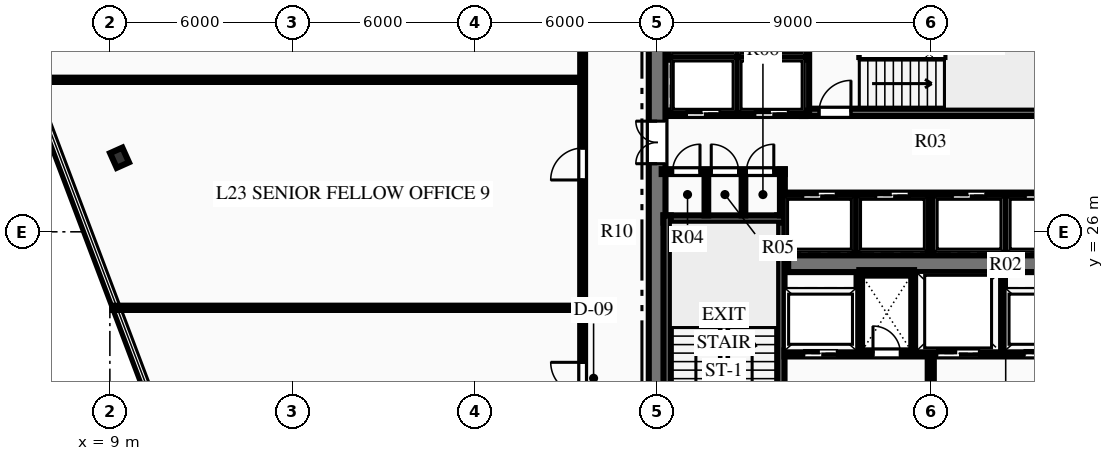
"""IFC4 building model, lengths in metres.
Left out: names, types, materials, properties, quantities, classifications, styles, units other than length and angle.
Written with IfcOpenShell. Run it as: python <this file> out.ifc"""

import sys

from ifc_helpers import new_model, si_unit, direction, frame, frame_2d, origin, origin_2d, place, context, subcontext, project, spatial, rectangle, i_section, extrude, element, fill, save


model = new_model("IFC4")
c1 = context("Model", 3, precision=1e-05, world=origin(), true_north=direction((0.0, 1.0)))
c2 = subcontext(c1, "Body", "Model", "MODEL_VIEW")
j1 = project(units=[si_unit("LENGTHUNIT", "METRE"), si_unit("PLANEANGLEUNIT", "RADIAN")], contexts=[c1])
p1 = place(None, origin())
s1 = spatial("IfcSite", under=j1, at=p1, CompositionType="ELEMENT")
p2 = place(p1, origin())
s2 = spatial("IfcBuilding", under=s1, at=p2, CompositionType="ELEMENT")
p3 = place(p2, frame((0.0, 0.0, 97.95)))
s3 = spatial("IfcBuildingStorey", under=s2, at=p3, CompositionType="ELEMENT", Elevation=97.95)
p4 = place(p3, frame((27.0, 18.275, 0.0), z_axis=(0.0, 0.0, 1.0), x_axis=(0.0, 1.0, 0.0)))
e1 = element("IfcWall", 1, at=p4, inside=s3, PredefinedType="SHEAR", context=c2, shape_type="SweptSolid", body=[
    extrude(rectangle(XDim=15.45, YDim=0.55, at=frame_2d((7.725, 0.0))), origin(), (0.0, 0.0, 1.0), 3.75),
])
p5 = place(p4, frame((9.965, 0.0, 0.0)))
e2 = element("IfcOpeningElement", 2, at=p5, cuts=e1, PredefinedType="OPENING", context=c2, shape_type="SweptSolid", body=[
    extrude(rectangle(XDim=1.4, YDim=2.2, at=frame_2d((0.7, 1.1))), frame((0.0, 0.285, 0.0), z_axis=(0.0, -1.0, 0.0), x_axis=(1.0, 0.0, 0.0)), (0.0, 0.0, 1.0), 0.57),
])
p6 = place(p3, frame((31.31, 24.95, 0.0), z_axis=(0.0, 0.0, 1.0), x_axis=(1.0, 0.0, 0.0)))
e3 = element("IfcWall", 3, at=p6, inside=s3, PredefinedType="SHEAR", context=c2, shape_type="SweptSolid", body=[
    extrude(rectangle(XDim=9.38, YDim=0.55, at=frame_2d((4.69, 0.0))), origin(), (0.0, 0.0, 1.0), 3.75),
])
p7 = place(p3, frame((31.07, 18.28, 0.0), z_axis=(0.0, 0.0, 1.0), x_axis=(0.0, 1.0, 0.0)))
e4 = element("IfcWall", 4, at=p7, inside=s3, PredefinedType="SHEAR", context=c2, shape_type="SweptSolid", body=[
    extrude(rectangle(XDim=8.26, YDim=0.24, at=frame_2d((4.13, 0.0))), origin(), (0.0, 0.0, 1.0), 3.75),
])
p8 = place(p7, frame((0.365, 0.0, 0.0)))
e5 = element("IfcOpeningElement", 5, at=p8, cuts=e4, PredefinedType="OPENING", context=c2, shape_type="SweptSolid", body=[
    extrude(rectangle(XDim=1.05, YDim=2.15, at=frame_2d((0.525, 1.075))), frame((0.0, 0.13, 0.0), z_axis=(0.0, -1.0, 0.0), x_axis=(1.0, 0.0, 0.0)), (0.0, 0.0, 1.0), 0.26),
])
p9 = place(p3, frame((27.21, 26.42, 0.0), z_axis=(0.0, 0.0, 1.0), x_axis=(1.0, 0.0, 0.0)))
e6 = element("IfcWall", 6, at=p9, inside=s3, PredefinedType="SHEAR", context=c2, shape_type="SweptSolid", body=[
    extrude(rectangle(XDim=3.98, YDim=0.24, at=frame_2d((1.99, 0.0))), origin(), (0.0, 0.0, 1.0), 3.75),
])
p10 = place(p3, frame((27.33, 18.28, 0.0), z_axis=(0.0, 0.0, 1.0), x_axis=(0.0, 1.0, 0.0)))
e7 = element("IfcWall", 7, at=p10, inside=s3, PredefinedType="SHEAR", context=c2, shape_type="SweptSolid", body=[
    extrude(rectangle(XDim=8.26, YDim=0.24, at=frame_2d((4.13, 0.0))), origin(), (0.0, 0.0, 1.0), 3.75),
])
p11 = place(p3, frame((31.76, 29.93, 0.0), z_axis=(0.0, 0.0, 1.0), x_axis=(1.0, 0.0, 0.0)))
e8 = element("IfcWall", 8, at=p11, inside=s3, PredefinedType="SHEAR", context=c2, shape_type="SweptSolid", body=[
    extrude(rectangle(XDim=8.38, YDim=0.24, at=frame_2d((4.19, 0.0))), origin(), (0.0, 0.0, 1.0), 3.75),
])
p12 = place(p11, frame((0.565, 0.0, 0.0)))
e9 = element("IfcOpeningElement", 9, at=p12, cuts=e8, PredefinedType="OPENING", context=c2, shape_type="SweptSolid", body=[
    extrude(rectangle(XDim=1.05, YDim=2.15, at=frame_2d((0.525, 1.075))), frame((0.0, 0.13, 0.0), z_axis=(0.0, -1.0, 0.0), x_axis=(1.0, 0.0, 0.0)), (0.0, 0.0, 1.0), 0.26),
])
p13 = place(p3, frame((31.88, 29.93, 0.0), z_axis=(0.0, 0.0, 1.0), x_axis=(0.0, 1.0, 0.0)))
e10 = element("IfcWall", 10, at=p13, inside=s3, PredefinedType="SHEAR", context=c2, shape_type="SweptSolid", body=[
    extrude(rectangle(XDim=3.79, YDim=0.24, at=frame_2d((1.895, 0.0))), origin(), (0.0, 0.0, 1.0), 3.75),
])
p14 = place(p3, frame((9.318, 28.437, 0.0), z_axis=(0.0, 0.0, 1.0), x_axis=(0.912477494148, 0.409126902895, 0.0)))
e11 = element("IfcColumn", 11, at=p14, inside=s3, PredefinedType="COLUMN", context=c2, shape_type="SweptSolid", body=[
    extrude(i_section(OverallWidth=0.442, OverallDepth=0.531, WebThickness=0.066, FlangeThickness=0.106, at=origin_2d()), origin(), (0.0, 0.0, 1.0), 3.75),
])
p15 = place(p3, frame((36.0, 18.28, 0.0), z_axis=(0.0, 0.0, 1.0), x_axis=(0.0, 1.0, 0.0)))
e12 = element("IfcWall", 12, at=p15, inside=s3, PredefinedType="PARTITIONING", context=c2, shape_type="SweptSolid", body=[
    extrude(rectangle(XDim=3.77, YDim=0.2, at=frame_2d((1.885, 0.0))), origin(), (0.0, 0.0, 1.0), 3.45),
])
p16 = place(p3, frame((31.19, 22.0, 0.0), z_axis=(0.0, 0.0, 1.0), x_axis=(1.0, 0.0, 0.0)))
e13 = element("IfcWall", 13, at=p16, inside=s3, PredefinedType="PARTITIONING", context=c2, shape_type="SweptSolid", body=[
    extrude(rectangle(XDim=4.69, YDim=0.2, at=frame_2d((2.345, 0.0))), origin(), (0.0, 0.0, 1.0), 3.45),
])
p17 = place(p16, frame((2.91, 0.0, 0.0)))
e14 = element("IfcOpeningElement", 14, at=p17, cuts=e13, PredefinedType="OPENING", context=c2, shape_type="SweptSolid", body=[
    extrude(rectangle(XDim=0.9, YDim=2.15, at=frame_2d((0.45, 1.075))), frame((0.0, 0.11, 0.0), z_axis=(0.0, -1.0, 0.0), x_axis=(1.0, 0.0, 0.0)), (0.0, 0.0, 1.0), 0.22),
])
p18 = place(p16, frame((0.635, 0.0, 0.0)))
e15 = element("IfcOpeningElement", 15, at=p18, cuts=e13, PredefinedType="OPENING", context=c2, shape_type="SweptSolid", body=[
    extrude(rectangle(XDim=1.1, YDim=2.15, at=frame_2d((0.55, 1.075))), frame((0.0, 0.11, 0.0), z_axis=(0.0, -1.0, 0.0), x_axis=(1.0, 0.0, 0.0)), (0.0, 0.0, 1.0), 0.22),
])
p19 = place(p3, frame((36.12, 22.0, 0.0), z_axis=(0.0, 0.0, 1.0), x_axis=(1.0, 0.0, 0.0)))
e16 = element("IfcWall", 16, at=p19, inside=s3, PredefinedType="PARTITIONING", context=c2, shape_type="SweptSolid", body=[
    extrude(rectangle(XDim=4.69, YDim=0.2, at=frame_2d((2.345, 0.0))), origin(), (0.0, 0.0, 1.0), 3.45),
])
p20 = place(p19, frame((2.955, 0.0, 0.0)))
e17 = element("IfcOpeningElement", 17, at=p20, cuts=e16, PredefinedType="OPENING", context=c2, shape_type="SweptSolid", body=[
    extrude(rectangle(XDim=1.1, YDim=2.15, at=frame_2d((0.55, 1.075))), frame((0.0, 0.11, 0.0), z_axis=(0.0, -1.0, 0.0), x_axis=(1.0, 0.0, 0.0)), (0.0, 0.0, 1.0), 0.22),
])
p21 = place(p19, frame((0.08, 0.0, 0.0)))
e18 = element("IfcOpeningElement", 18, at=p21, cuts=e16, PredefinedType="OPENING", context=c2, shape_type="SweptSolid", body=[
    extrude(rectangle(XDim=1.4, YDim=2.2, at=frame_2d((0.7, 1.1))), frame((0.0, 0.11, 0.0), z_axis=(0.0, -1.0, 0.0), x_axis=(1.0, 0.0, 0.0)), (0.0, 0.0, 1.0), 0.22),
])
for number, where, z_axis, x_axis in (
    (19, (33.65, 22.05, 0.0), (0.0, 0.0, 1.0), (0.0, 1.0, 0.0)),
    (20, (35.45, 22.05, 0.0), (0.0, 0.0, 1.0), (0.0, 1.0, 0.0)),
):
    element("IfcWall", number, at=place(p3, frame(where, z_axis=z_axis, x_axis=x_axis)), inside=s3, PredefinedType="PARTITIONING", context=c2, shape_type="SweptSolid", body=[
        extrude(rectangle(XDim=2.6, YDim=0.18, at=frame_2d((1.3, 0.0))), origin(), (0.0, 0.0, 1.0), 3.45),
    ])
p22 = place(p3, frame((33.65, 24.65, 0.0), z_axis=(0.0, 0.0, 1.0), x_axis=(1.0, 0.0, 0.0)))
e21 = element("IfcWall", 21, at=p22, inside=s3, PredefinedType="PARTITIONING", context=c2, shape_type="SweptSolid", body=[
    extrude(rectangle(XDim=1.8, YDim=0.18, at=frame_2d((0.9, 0.0))), origin(), (0.0, 0.0, 1.0), 3.45),
])
p23 = place(p3, frame((38.35, 22.05, 0.0), z_axis=(0.0, 0.0, 1.0), x_axis=(0.0, 1.0, 0.0)))
e22 = element("IfcWall", 22, at=p23, inside=s3, PredefinedType="PARTITIONING", context=c2, shape_type="SweptSolid", body=[
    extrude(rectangle(XDim=2.6, YDim=0.18, at=frame_2d((1.3, 0.0))), origin(), (0.0, 0.0, 1.0), 3.45),
])
p24 = place(p3, frame((27.15, 27.98, 0.0), z_axis=(0.0, 0.0, 1.0), x_axis=(1.0, 0.0, 0.0)))
e23 = element("IfcWall", 23, at=p24, inside=s3, PredefinedType="PARTITIONING", context=c2, shape_type="SweptSolid", body=[
    extrude(rectangle(XDim=4.05, YDim=0.16, at=frame_2d((2.025, 0.0))), origin(), (0.0, 0.0, 1.0), 3.45),
])
p25 = place(p24, frame((0.36, 0.0, 0.0)))
e24 = element("IfcOpeningElement", 24, at=p25, cuts=e23, PredefinedType="OPENING", context=c2, shape_type="SweptSolid", body=[
    extrude(rectangle(XDim=0.9, YDim=2.15, at=frame_2d((0.45, 1.075))), frame((0.0, 0.09, 0.0), z_axis=(0.0, -1.0, 0.0), x_axis=(1.0, 0.0, 0.0)), (0.0, 0.0, 1.0), 0.18),
])
p26 = place(p24, frame((1.63, 0.0, 0.0)))
e25 = element("IfcOpeningElement", 25, at=p26, cuts=e23, PredefinedType="OPENING", context=c2, shape_type="SweptSolid", body=[
    extrude(rectangle(XDim=0.9, YDim=2.15, at=frame_2d((0.45, 1.075))), frame((0.0, 0.09, 0.0), z_axis=(0.0, -1.0, 0.0), x_axis=(1.0, 0.0, 0.0)), (0.0, 0.0, 1.0), 0.18),
])
p27 = place(p24, frame((2.788, 0.0, 0.0)))
e26 = element("IfcOpeningElement", 26, at=p27, cuts=e23, PredefinedType="OPENING", context=c2, shape_type="SweptSolid", body=[
    extrude(rectangle(XDim=0.9, YDim=2.15, at=frame_2d((0.45, 1.075))), frame((0.0, 0.09, 0.0), z_axis=(0.0, -1.0, 0.0), x_axis=(1.0, 0.0, 0.0)), (0.0, 0.0, 1.0), 0.18),
])
p28 = place(p3, frame((31.12, 26.54, 0.0), z_axis=(0.0, 0.0, 1.0), x_axis=(0.0, 1.0, 0.0)))
e27 = element("IfcWall", 27, at=p28, inside=s3, PredefinedType="PARTITIONING", context=c2, shape_type="SweptSolid", body=[
    extrude(rectangle(XDim=1.51, YDim=0.16, at=frame_2d((0.755, 0.0))), origin(), (0.0, 0.0, 1.0), 3.45),
])
for number, where, z_axis, x_axis in (
    (28, (28.62, 26.54, 0.0), (0.0, 0.0, 1.0), (0.0, 1.0, 0.0)),
    (29, (29.84, 26.54, 0.0), (0.0, 0.0, 1.0), (0.0, 1.0, 0.0)),
):
    element("IfcWall", number, at=place(p3, frame(where, z_axis=z_axis, x_axis=x_axis)), inside=s3, PredefinedType="PARTITIONING", context=c2, shape_type="SweptSolid", body=[
        extrude(rectangle(XDim=1.44, YDim=0.12, at=frame_2d((0.72, 0.0))), origin(), (0.0, 0.0, 1.0), 3.45),
    ])
p29 = place(p3, frame((27.45, 29.9, 0.0), z_axis=(0.0, 0.0, 1.0), x_axis=(1.0, 0.0, 0.0)))
e30 = element("IfcWall", 30, at=p29, inside=s3, PredefinedType="PARTITIONING", context=c2, shape_type="SweptSolid", body=[
    extrude(rectangle(XDim=4.43, YDim=0.18, at=frame_2d((2.215, 0.0))), origin(), (0.0, 0.0, 1.0), 3.45),
])
p30 = place(p29, frame((0.515, 0.0, 0.0)))
e31 = element("IfcOpeningElement", 31, at=p30, cuts=e30, PredefinedType="OPENING", context=c2, shape_type="SweptSolid", body=[
    extrude(rectangle(XDim=1.1, YDim=2.15, at=frame_2d((0.55, 1.075))), frame((0.0, 0.1, 0.0), z_axis=(0.0, -1.0, 0.0), x_axis=(1.0, 0.0, 0.0)), (0.0, 0.0, 1.0), 0.2),
])
p31 = place(p29, frame((2.765, 0.0, 0.0)))
e32 = element("IfcOpeningElement", 32, at=p31, cuts=e30, PredefinedType="OPENING", context=c2, shape_type="SweptSolid", body=[
    extrude(rectangle(XDim=1.1, YDim=2.15, at=frame_2d((0.55, 1.075))), frame((0.0, 0.1, 0.0), z_axis=(0.0, -1.0, 0.0), x_axis=(1.0, 0.0, 0.0)), (0.0, 0.0, 1.0), 0.2),
])
p32 = place(p3, frame((27.45, 31.75, 0.0), z_axis=(0.0, 0.0, 1.0), x_axis=(1.0, 0.0, 0.0)))
e33 = element("IfcWall", 33, at=p32, inside=s3, PredefinedType="PARTITIONING", context=c2, shape_type="SweptSolid", body=[
    extrude(rectangle(XDim=4.43, YDim=0.18, at=frame_2d((2.215, 0.0))), origin(), (0.0, 0.0, 1.0), 3.45),
])
p33 = place(p3, frame((29.63, 29.9, 0.0), z_axis=(0.0, 0.0, 1.0), x_axis=(0.0, 1.0, 0.0)))
e34 = element("IfcWall", 34, at=p33, inside=s3, PredefinedType="PARTITIONING", context=c2, shape_type="SweptSolid", body=[
    extrude(rectangle(XDim=3.75, YDim=0.18, at=frame_2d((1.875, 0.0))), origin(), (0.0, 0.0, 1.0), 3.45),
])
p34 = place(p3, frame((31.2, 27.2, 0.0), z_axis=(0.0, 0.0, 1.0), x_axis=(1.0, 0.0, 0.0)))
e35 = element("IfcWall", 35, at=p34, inside=s3, PredefinedType="PARTITIONING", context=c2, shape_type="SweptSolid", body=[
    extrude(rectangle(XDim=9.6, YDim=0.18, at=frame_2d((4.8, 0.0))), origin(), (0.0, 0.0, 1.0), 3.45),
])
p35 = place(p34, frame((0.59, 0.0, 0.0)))
e36 = element("IfcOpeningElement", 36, at=p35, cuts=e35, PredefinedType="OPENING", context=c2, shape_type="SweptSolid", body=[
    extrude(rectangle(XDim=1.1, YDim=2.15, at=frame_2d((0.55, 1.075))), frame((0.0, 0.1, 0.0), z_axis=(0.0, -1.0, 0.0), x_axis=(1.0, 0.0, 0.0)), (0.0, 0.0, 1.0), 0.2),
])
p36 = place(p34, frame((2.99, 0.0, 0.0)))
e37 = element("IfcOpeningElement", 37, at=p36, cuts=e35, PredefinedType="OPENING", context=c2, shape_type="SweptSolid", body=[
    extrude(rectangle(XDim=1.1, YDim=2.15, at=frame_2d((0.55, 1.075))), frame((0.0, 0.1, 0.0), z_axis=(0.0, -1.0, 0.0), x_axis=(1.0, 0.0, 0.0)), (0.0, 0.0, 1.0), 0.2),
])
p37 = place(p34, frame((5.51, 0.0, 0.0)))
e38 = element("IfcOpeningElement", 38, at=p37, cuts=e35, PredefinedType="OPENING", context=c2, shape_type="SweptSolid", body=[
    extrude(rectangle(XDim=1.1, YDim=2.15, at=frame_2d((0.55, 1.075))), frame((0.0, 0.1, 0.0), z_axis=(0.0, -1.0, 0.0), x_axis=(1.0, 0.0, 0.0)), (0.0, 0.0, 1.0), 0.2),
])
p38 = place(p34, frame((7.91, 0.0, 0.0)))
e39 = element("IfcOpeningElement", 39, at=p38, cuts=e35, PredefinedType="OPENING", context=c2, shape_type="SweptSolid", body=[
    extrude(rectangle(XDim=1.1, YDim=2.15, at=frame_2d((0.55, 1.075))), frame((0.0, 0.1, 0.0), z_axis=(0.0, -1.0, 0.0), x_axis=(1.0, 0.0, 0.0)), (0.0, 0.0, 1.0), 0.2),
])
for number, where, z_axis, x_axis in (
    (40, (33.54, 25.3, 0.0), (0.0, 0.0, 1.0), (0.0, 1.0, 0.0)),
    (41, (36.0, 25.3, 0.0), (0.0, 0.0, 1.0), (0.0, 1.0, 0.0)),
    (42, (38.46, 25.3, 0.0), (0.0, 0.0, 1.0), (0.0, 1.0, 0.0)),
):
    element("IfcWall", number, at=place(p3, frame(where, z_axis=z_axis, x_axis=x_axis)), inside=s3, PredefinedType="PARTITIONING", context=c2, shape_type="SweptSolid", body=[
        extrude(rectangle(XDim=1.9, YDim=0.18, at=frame_2d((0.95, 0.0))), origin(), (0.0, 0.0, 1.0), 3.45),
    ])
p39 = place(p3, frame((24.55, 15.55, 0.0), z_axis=(0.0, 0.0, 1.0), x_axis=(0.0, 1.0, 0.0)))
e43 = element("IfcWall", 43, at=p39, inside=s3, PredefinedType="PARTITIONING", context=c2, shape_type="SweptSolid", body=[
    extrude(rectangle(XDim=20.9, YDim=0.16, at=frame_2d((10.45, 0.0))), origin(), (0.0, 0.0, 1.0), 3.45),
])
p40 = place(p39, frame((5.107, 0.0, 0.0)))
e44 = element("IfcOpeningElement", 44, at=p40, cuts=e43, PredefinedType="OPENING", context=c2, shape_type="SweptSolid", body=[
    extrude(rectangle(XDim=1.05, YDim=2.15, at=frame_2d((0.525, 1.075))), frame((0.0, 0.09, 0.0), z_axis=(0.0, -1.0, 0.0), x_axis=(1.0, 0.0, 0.0)), (0.0, 0.0, 1.0), 0.18),
])
p41 = place(p39, frame((12.155, 0.0, 0.0)))
e45 = element("IfcOpeningElement", 45, at=p41, cuts=e43, PredefinedType="OPENING", context=c2, shape_type="SweptSolid", body=[
    extrude(rectangle(XDim=1.05, YDim=2.15, at=frame_2d((0.525, 1.075))), frame((0.0, 0.09, 0.0), z_axis=(0.0, -1.0, 0.0), x_axis=(1.0, 0.0, 0.0)), (0.0, 0.0, 1.0), 0.18),
])
p42 = place(p39, frame((16.443, 0.0, 0.0)))
e46 = element("IfcOpeningElement", 46, at=p42, cuts=e43, PredefinedType="OPENING", context=c2, shape_type="SweptSolid", body=[
    extrude(rectangle(XDim=1.05, YDim=2.15, at=frame_2d((0.525, 1.075))), frame((0.0, 0.09, 0.0), z_axis=(0.0, -1.0, 0.0), x_axis=(1.0, 0.0, 0.0)), (0.0, 0.0, 1.0), 0.18),
])
p43 = place(p3, frame((9.086, 23.5, 0.0), z_axis=(0.0, 0.0, 1.0), x_axis=(1.0, 0.0, 0.0)))
e47 = element("IfcWall", 47, at=p43, inside=s3, PredefinedType="PARTITIONING", context=c2, shape_type="SweptSolid", body=[
    extrude(rectangle(XDim=15.464, YDim=0.14, at=frame_2d((7.732, 0.0))), origin(), (0.0, 0.0, 1.0), 3.45),
])
p44 = place(p3, frame((6.252, 31.0, 0.0), z_axis=(0.0, 0.0, 1.0), x_axis=(1.0, 0.0, 0.0)))
e48 = element("IfcWall", 48, at=p44, inside=s3, PredefinedType="PARTITIONING", context=c2, shape_type="SweptSolid", body=[
    extrude(rectangle(XDim=18.298, YDim=0.14, at=frame_2d((9.149, 0.0))), origin(), (0.0, 0.0, 1.0), 3.45),
])
p45 = place(p25, origin())
e49 = element("IfcDoor", 49, at=p45, inside=s3, OperationType="SINGLE_SWING_RIGHT", PredefinedType="DOOR", context=c2, shape_type="SweptSolid", body=[
    extrude(rectangle(XDim=0.9, YDim=2.15, at=frame_2d((0.45, 1.075))), frame((0.0, 0.025, 0.0), z_axis=(0.0, -1.0, 0.0), x_axis=(1.0, 0.0, 0.0)), (0.0, 0.0, 1.0), 0.05),
])
fill(e24, e49)
p46 = place(p26, origin())
e50 = element("IfcDoor", 50, at=p46, inside=s3, OperationType="SINGLE_SWING_LEFT", PredefinedType="DOOR", context=c2, shape_type="SweptSolid", body=[
    extrude(rectangle(XDim=0.9, YDim=2.15, at=frame_2d((0.45, 1.075))), frame((0.0, 0.025, 0.0), z_axis=(0.0, -1.0, 0.0), x_axis=(1.0, 0.0, 0.0)), (0.0, 0.0, 1.0), 0.05),
])
fill(e25, e50)
p47 = place(p27, origin())
e51 = element("IfcDoor", 51, at=p47, inside=s3, OperationType="SINGLE_SWING_RIGHT", PredefinedType="DOOR", context=c2, shape_type="SweptSolid", body=[
    extrude(rectangle(XDim=0.9, YDim=2.15, at=frame_2d((0.45, 1.075))), frame((0.0, 0.025, 0.0), z_axis=(0.0, -1.0, 0.0), x_axis=(1.0, 0.0, 0.0)), (0.0, 0.0, 1.0), 0.05),
])
fill(e26, e51)
p48 = place(p12, origin())
e52 = element("IfcDoor", 52, at=p48, inside=s3, OperationType="SINGLE_SWING_RIGHT", PredefinedType="DOOR", context=c2, shape_type="SweptSolid", body=[
    extrude(rectangle(XDim=1.05, YDim=2.15, at=frame_2d((0.525, 1.075))), frame((0.0, 0.025, 0.0), z_axis=(0.0, -1.0, 0.0), x_axis=(1.0, 0.0, 0.0)), (0.0, 0.0, 1.0), 0.05),
])
fill(e9, e52)
p49 = place(p17, origin())
e53 = element("IfcDoor", 53, at=p49, inside=s3, OperationType="SINGLE_SWING_LEFT", PredefinedType="DOOR", context=c2, shape_type="SweptSolid", body=[
    extrude(rectangle(XDim=0.9, YDim=2.15, at=frame_2d((0.45, 1.075))), frame((0.0, 0.025, 0.0), z_axis=(0.0, -1.0, 0.0), x_axis=(1.0, 0.0, 0.0)), (0.0, 0.0, 1.0), 0.05),
])
fill(e14, e53)
p50 = place(p5, origin())
e54 = element("IfcDoor", 54, at=p50, inside=s3, OperationType="DOUBLE_DOOR_SINGLE_SWING", PredefinedType="DOOR", context=c2, shape_type="SweptSolid", body=[
    extrude(rectangle(XDim=1.4, YDim=2.2, at=frame_2d((0.7, 1.1))), frame((0.0, 0.025, 0.0), z_axis=(0.0, -1.0, 0.0), x_axis=(1.0, 0.0, 0.0)), (0.0, 0.0, 1.0), 0.05),
])
fill(e2, e54)
p51 = place(p40, origin())
e55 = element("IfcDoor", 55, at=p51, inside=s3, OperationType="SINGLE_SWING_RIGHT", PredefinedType="DOOR", context=c2, shape_type="SweptSolid", body=[
    extrude(rectangle(XDim=1.05, YDim=2.15, at=frame_2d((0.525, 1.075))), frame((0.0, 0.025, 0.0), z_axis=(0.0, -1.0, 0.0), x_axis=(1.0, 0.0, 0.0)), (0.0, 0.0, 1.0), 0.05),
])
fill(e44, e55)
p52 = place(p41, origin())
e56 = element("IfcDoor", 56, at=p52, inside=s3, OperationType="SINGLE_SWING_LEFT", PredefinedType="DOOR", context=c2, shape_type="SweptSolid", body=[
    extrude(rectangle(XDim=1.05, YDim=2.15, at=frame_2d((0.525, 1.075))), frame((0.0, 0.025, 0.0), z_axis=(0.0, -1.0, 0.0), x_axis=(1.0, 0.0, 0.0)), (0.0, 0.0, 1.0), 0.05),
])
fill(e45, e56)
p53 = place(p30, origin())
e57 = element("IfcDoor", 57, at=p53, inside=s3, OperationType="SLIDING_TO_LEFT", PredefinedType="DOOR", context=c2, shape_type="SweptSolid", body=[
    extrude(rectangle(XDim=1.1, YDim=2.15, at=frame_2d((0.55, 1.075))), frame((0.0, 0.025, 0.0), z_axis=(0.0, -1.0, 0.0), x_axis=(1.0, 0.0, 0.0)), (0.0, 0.0, 1.0), 0.05),
])
fill(e31, e57)
p54 = place(p31, origin())
e58 = element("IfcDoor", 58, at=p54, inside=s3, OperationType="SLIDING_TO_LEFT", PredefinedType="DOOR", context=c2, shape_type="SweptSolid", body=[
    extrude(rectangle(XDim=1.1, YDim=2.15, at=frame_2d((0.55, 1.075))), frame((0.0, 0.025, 0.0), z_axis=(0.0, -1.0, 0.0), x_axis=(1.0, 0.0, 0.0)), (0.0, 0.0, 1.0), 0.05),
])
fill(e32, e58)
p55 = place(p35, origin())
e59 = element("IfcDoor", 59, at=p55, inside=s3, OperationType="SLIDING_TO_LEFT", PredefinedType="DOOR", context=c2, shape_type="SweptSolid", body=[
    extrude(rectangle(XDim=1.1, YDim=2.15, at=frame_2d((0.55, 1.075))), frame((0.0, 0.025, 0.0), z_axis=(0.0, -1.0, 0.0), x_axis=(1.0, 0.0, 0.0)), (0.0, 0.0, 1.0), 0.05),
])
fill(e36, e59)
p56 = place(p36, origin())
e60 = element("IfcDoor", 60, at=p56, inside=s3, OperationType="SLIDING_TO_LEFT", PredefinedType="DOOR", context=c2, shape_type="SweptSolid", body=[
    extrude(rectangle(XDim=1.1, YDim=2.15, at=frame_2d((0.55, 1.075))), frame((0.0, 0.025, 0.0), z_axis=(0.0, -1.0, 0.0), x_axis=(1.0, 0.0, 0.0)), (0.0, 0.0, 1.0), 0.05),
])
fill(e37, e60)
p57 = place(p37, origin())
e61 = element("IfcDoor", 61, at=p57, inside=s3, OperationType="SLIDING_TO_LEFT", PredefinedType="DOOR", context=c2, shape_type="SweptSolid", body=[
    extrude(rectangle(XDim=1.1, YDim=2.15, at=frame_2d((0.55, 1.075))), frame((0.0, 0.025, 0.0), z_axis=(0.0, -1.0, 0.0), x_axis=(1.0, 0.0, 0.0)), (0.0, 0.0, 1.0), 0.05),
])
fill(e38, e61)
p58 = place(p38, origin())
e62 = element("IfcDoor", 62, at=p58, inside=s3, OperationType="SLIDING_TO_LEFT", PredefinedType="DOOR", context=c2, shape_type="SweptSolid", body=[
    extrude(rectangle(XDim=1.1, YDim=2.15, at=frame_2d((0.55, 1.075))), frame((0.0, 0.025, 0.0), z_axis=(0.0, -1.0, 0.0), x_axis=(1.0, 0.0, 0.0)), (0.0, 0.0, 1.0), 0.05),
])
fill(e39, e62)
p59 = place(p18, origin())
e63 = element("IfcDoor", 63, at=p59, inside=s3, OperationType="SLIDING_TO_LEFT", PredefinedType="DOOR", context=c2, shape_type="SweptSolid", body=[
    extrude(rectangle(XDim=1.1, YDim=2.15, at=frame_2d((0.55, 1.075))), frame((0.0, 0.025, 0.0), z_axis=(0.0, -1.0, 0.0), x_axis=(1.0, 0.0, 0.0)), (0.0, 0.0, 1.0), 0.05),
])
fill(e15, e63)
p60 = place(p20, origin())
e64 = element("IfcDoor", 64, at=p60, inside=s3, OperationType="SLIDING_TO_LEFT", PredefinedType="DOOR", context=c2, shape_type="SweptSolid", body=[
    extrude(rectangle(XDim=1.1, YDim=2.15, at=frame_2d((0.55, 1.075))), frame((0.0, 0.025, 0.0), z_axis=(0.0, -1.0, 0.0), x_axis=(1.0, 0.0, 0.0)), (0.0, 0.0, 1.0), 0.05),
])
fill(e17, e64)
p61 = place(p21, origin())
e65 = element("IfcDoor", 65, at=p61, inside=s3, OperationType="SLIDING_TO_LEFT", PredefinedType="DOOR", context=c2, shape_type="SweptSolid", body=[
    extrude(rectangle(XDim=1.4, YDim=2.2, at=frame_2d((0.7, 1.1))), frame((0.0, 0.025, 0.0), z_axis=(0.0, -1.0, 0.0), x_axis=(1.0, 0.0, 0.0)), (0.0, 0.0, 1.0), 0.05),
])
fill(e18, e65)
save(model, sys.argv[1])
